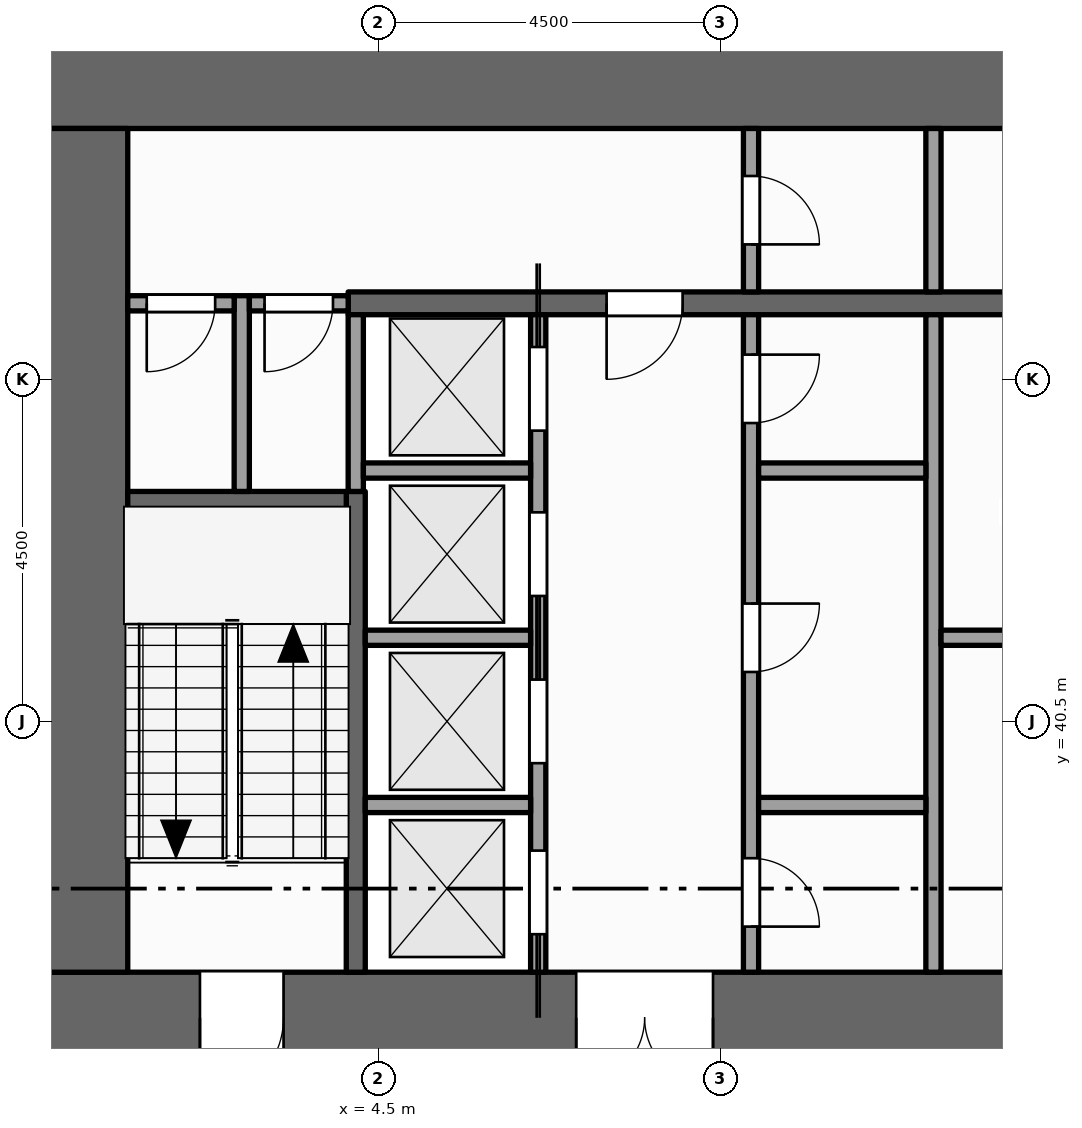
"""IFC4 building model, lengths in metres.
Left out: names, types, materials, properties, quantities, classifications, styles, units other than length and angle.
Written with IfcOpenShell. Run it as: python <this file> out.ifc"""

import sys

from ifc_helpers import new_model, si_unit, direction, frame, frame_2d, origin, place, context, subcontext, project, spatial, rectangle, extrude, element, fill, save


model = new_model("IFC4")
c1 = context("Model", 3, precision=1e-05, world=origin(), true_north=direction((0.0, 1.0)))
c2 = subcontext(c1, "Body", "Model", "MODEL_VIEW")
j1 = project(units=[si_unit("LENGTHUNIT", "METRE"), si_unit("PLANEANGLEUNIT", "RADIAN")], contexts=[c1])
p1 = place(None, origin())
s1 = spatial("IfcSite", under=j1, at=p1, CompositionType="ELEMENT")
p2 = place(p1, origin())
s2 = spatial("IfcBuilding", under=s1, at=p2, CompositionType="ELEMENT")
p3 = place(p2, frame((0.0, 0.0, 103.0)))
s3 = spatial("IfcBuildingStorey", under=s2, at=p3, CompositionType="ELEMENT", Elevation=103.0)
p4 = place(p3, frame((0.0, 36.6, -0.15), z_axis=(0.0, 0.0, 1.0), x_axis=(1.0, 0.0, 0.0)))
e1 = element("IfcWall", 1, at=p4, inside=s3, PredefinedType="SHEAR", context=c2, shape_type="SweptSolid", body=[
    extrude(rectangle(XDim=22.5, YDim=1.2, at=frame_2d((11.25, 0.0))), origin(), (0.0, 0.0, 1.0), 4.0),
])
p5 = place(p4, frame((7.1, 0.0, 0.15)))
e2 = element("IfcOpeningElement", 2, at=p5, cuts=e1, PredefinedType="OPENING", context=c2, shape_type="SweptSolid", body=[
    extrude(rectangle(XDim=1.8, YDim=2.1, at=frame_2d((0.9, 1.05))), frame((0.0, 0.61, 0.0), z_axis=(0.0, -1.0, 0.0), x_axis=(1.0, 0.0, 0.0)), (0.0, 0.0, 1.0), 1.22),
])
p6 = place(p4, frame((13.15, 0.0, 0.15)))
e3 = element("IfcOpeningElement", 3, at=p6, cuts=e1, PredefinedType="OPENING", context=c2, shape_type="SweptSolid", body=[
    extrude(rectangle(XDim=1.1, YDim=2.1, at=frame_2d((0.55, 1.05))), frame((0.0, 0.61, 0.0), z_axis=(0.0, -1.0, 0.0), x_axis=(1.0, 0.0, 0.0)), (0.0, 0.0, 1.0), 1.22),
])
p7 = place(p4, frame((2.15, 0.0, 0.15)))
e4 = element("IfcOpeningElement", 4, at=p7, cuts=e1, PredefinedType="OPENING", context=c2, shape_type="SweptSolid", body=[
    extrude(rectangle(XDim=1.1, YDim=2.1, at=frame_2d((0.55, 1.05))), frame((0.0, 0.61, 0.0), z_axis=(0.0, -1.0, 0.0), x_axis=(1.0, 0.0, 0.0)), (0.0, 0.0, 1.0), 1.22),
])
p8 = place(p4, frame((19.35, 0.0, 0.15)))
e5 = element("IfcOpeningElement", 5, at=p8, cuts=e1, PredefinedType="OPENING", context=c2, shape_type="SweptSolid", body=[
    extrude(rectangle(XDim=1.1, YDim=2.1, at=frame_2d((0.55, 1.05))), frame((0.0, 0.61, 0.0), z_axis=(0.0, -1.0, 0.0), x_axis=(1.0, 0.0, 0.0)), (0.0, 0.0, 1.0), 1.22),
])
p9 = place(p3, frame((0.0, 48.9, -0.15), z_axis=(0.0, 0.0, 1.0), x_axis=(1.0, 0.0, 0.0)))
e6 = element("IfcWall", 6, at=p9, inside=s3, PredefinedType="SHEAR", context=c2, shape_type="SweptSolid", body=[
    extrude(rectangle(XDim=22.5, YDim=1.2, at=frame_2d((11.25, 0.0))), origin(), (0.0, 0.0, 1.0), 4.0),
])
p10 = place(p3, frame((0.6, 37.2, -0.15), z_axis=(0.0, 0.0, 1.0), x_axis=(0.0, 1.0, 0.0)))
e7 = element("IfcWall", 7, at=p10, inside=s3, PredefinedType="SHEAR", context=c2, shape_type="SweptSolid", body=[
    extrude(rectangle(XDim=11.1, YDim=1.2, at=frame_2d((5.55, 0.0))), origin(), (0.0, 0.0, 1.0), 4.0),
])
p11 = place(p3, frame((2.7, 43.525, 0.0), z_axis=(0.0, 0.0, 1.0), x_axis=(0.0, 1.0, 0.0)))
e8 = element("IfcWall", 8, at=p11, inside=s3, PredefinedType="PARTITIONING", context=c2, shape_type="SweptSolid", body=[
    extrude(rectangle(XDim=2.575, YDim=0.2, at=frame_2d((1.288, 0.0))), origin(), (0.0, 0.0, 1.0), 3.85),
])
p12 = place(p3, frame((4.2, 37.2, 0.0), z_axis=(0.0, 0.0, 1.0), x_axis=(0.0, 1.0, 0.0)))
e9 = element("IfcWall", 9, at=p12, inside=s3, PredefinedType="SHEAR", context=c2, shape_type="SweptSolid", body=[
    extrude(rectangle(XDim=6.325, YDim=0.25, at=frame_2d((3.163, 0.0))), origin(), (0.0, 0.0, 1.0), 3.85),
])
p13 = place(p3, frame((4.2, 43.525, 0.0), z_axis=(0.0, 0.0, 1.0), x_axis=(0.0, 1.0, 0.0)))
e10 = element("IfcWall", 10, at=p13, inside=s3, PredefinedType="SOLIDWALL", context=c2, shape_type="SweptSolid", body=[
    extrude(rectangle(XDim=2.325, YDim=0.2, at=frame_2d((1.163, 0.0))), origin(), (0.0, 0.0, 1.0), 3.85),
])
p14 = place(p3, frame((6.6, 37.2, 0.0), z_axis=(0.0, 0.0, 1.0), x_axis=(0.0, 1.0, 0.0)))
e11 = element("IfcWall", 11, at=p14, inside=s3, PredefinedType="SOLIDWALL", context=c2, shape_type="SweptSolid", body=[
    extrude(rectangle(XDim=8.65, YDim=0.2, at=frame_2d((4.325, 0.0))), origin(), (0.0, 0.0, 1.0), 3.85),
])
p15 = place(p14, frame((0.5, 0.0, 0.012)))
e12 = element("IfcOpeningElement", 12, at=p15, cuts=e11, PredefinedType="OPENING", context=c2, shape_type="SweptSolid", body=[
    extrude(rectangle(XDim=1.1, YDim=2.1, at=frame_2d((0.55, 1.05))), frame((0.0, 0.11, 0.0), z_axis=(0.0, -1.0, 0.0), x_axis=(1.0, 0.0, 0.0)), (0.0, 0.0, 1.0), 0.22),
])
p16 = place(p14, frame((2.75, 0.0, 0.012)))
e13 = element("IfcOpeningElement", 13, at=p16, cuts=e11, PredefinedType="OPENING", context=c2, shape_type="SweptSolid", body=[
    extrude(rectangle(XDim=1.1, YDim=2.1, at=frame_2d((0.55, 1.05))), frame((0.0, 0.11, 0.0), z_axis=(0.0, -1.0, 0.0), x_axis=(1.0, 0.0, 0.0)), (0.0, 0.0, 1.0), 0.22),
])
p17 = place(p14, frame((4.95, 0.0, 0.012)))
e14 = element("IfcOpeningElement", 14, at=p17, cuts=e11, PredefinedType="OPENING", context=c2, shape_type="SweptSolid", body=[
    extrude(rectangle(XDim=1.1, YDim=2.1, at=frame_2d((0.55, 1.05))), frame((0.0, 0.11, 0.0), z_axis=(0.0, -1.0, 0.0), x_axis=(1.0, 0.0, 0.0)), (0.0, 0.0, 1.0), 0.22),
])
p18 = place(p14, frame((7.125, 0.0, 0.012)))
e15 = element("IfcOpeningElement", 15, at=p18, cuts=e11, PredefinedType="OPENING", context=c2, shape_type="SweptSolid", body=[
    extrude(rectangle(XDim=1.1, YDim=2.1, at=frame_2d((0.55, 1.05))), frame((0.0, 0.11, 0.0), z_axis=(0.0, -1.0, 0.0), x_axis=(1.0, 0.0, 0.0)), (0.0, 0.0, 1.0), 0.22),
])
p19 = place(p3, frame((9.4, 37.2, 0.0), z_axis=(0.0, 0.0, 1.0), x_axis=(0.0, 1.0, 0.0)))
e16 = element("IfcWall", 16, at=p19, inside=s3, PredefinedType="PARTITIONING", context=c2, shape_type="SweptSolid", body=[
    extrude(rectangle(XDim=8.65, YDim=0.2, at=frame_2d((4.325, 0.0))), origin(), (0.0, 0.0, 1.0), 3.85),
])
p20 = place(p19, frame((0.6, 0.0, 0.0)))
e17 = element("IfcOpeningElement", 17, at=p20, cuts=e16, PredefinedType="OPENING", context=c2, shape_type="SweptSolid", body=[
    extrude(rectangle(XDim=0.9, YDim=2.1, at=frame_2d((0.45, 1.05))), frame((0.0, 0.11, 0.0), z_axis=(0.0, -1.0, 0.0), x_axis=(1.0, 0.0, 0.0)), (0.0, 0.0, 1.0), 0.22),
])
p21 = place(p19, frame((3.95, 0.0, 0.0)))
e18 = element("IfcOpeningElement", 18, at=p21, cuts=e16, PredefinedType="OPENING", context=c2, shape_type="SweptSolid", body=[
    extrude(rectangle(XDim=0.9, YDim=2.1, at=frame_2d((0.45, 1.05))), frame((0.0, 0.11, 0.0), z_axis=(0.0, -1.0, 0.0), x_axis=(1.0, 0.0, 0.0)), (0.0, 0.0, 1.0), 0.22),
])
p22 = place(p19, frame((7.225, 0.0, 0.0)))
e19 = element("IfcOpeningElement", 19, at=p22, cuts=e16, PredefinedType="OPENING", context=c2, shape_type="SweptSolid", body=[
    extrude(rectangle(XDim=0.9, YDim=2.1, at=frame_2d((0.45, 1.05))), frame((0.0, 0.11, 0.0), z_axis=(0.0, -1.0, 0.0), x_axis=(1.0, 0.0, 0.0)), (0.0, 0.0, 1.0), 0.22),
])
p23 = place(p3, frame((9.4, 46.15, 0.0), z_axis=(0.0, 0.0, 1.0), x_axis=(0.0, 1.0, 0.0)))
e20 = element("IfcWall", 20, at=p23, inside=s3, PredefinedType="PARTITIONING", context=c2, shape_type="SweptSolid", body=[
    extrude(rectangle(XDim=2.15, YDim=0.2, at=frame_2d((1.075, 0.0))), origin(), (0.0, 0.0, 1.0), 3.85),
])
p24 = place(p23, frame((0.625, 0.0, 0.0)))
e21 = element("IfcOpeningElement", 21, at=p24, cuts=e20, PredefinedType="OPENING", context=c2, shape_type="SweptSolid", body=[
    extrude(rectangle(XDim=0.9, YDim=2.1, at=frame_2d((0.45, 1.05))), frame((0.0, 0.11, 0.0), z_axis=(0.0, -1.0, 0.0), x_axis=(1.0, 0.0, 0.0)), (0.0, 0.0, 1.0), 0.22),
])
p25 = place(p3, frame((11.8, 37.2, 0.0), z_axis=(0.0, 0.0, 1.0), x_axis=(0.0, 1.0, 0.0)))
e22 = element("IfcWall", 22, at=p25, inside=s3, PredefinedType="PARTITIONING", context=c2, shape_type="SweptSolid", body=[
    extrude(rectangle(XDim=8.65, YDim=0.2, at=frame_2d((4.325, 0.0))), origin(), (0.0, 0.0, 1.0), 3.85),
])
p26 = place(p3, frame((11.8, 46.15, 0.0), z_axis=(0.0, 0.0, 1.0), x_axis=(0.0, 1.0, 0.0)))
e23 = element("IfcWall", 23, at=p26, inside=s3, PredefinedType="PARTITIONING", context=c2, shape_type="SweptSolid", body=[
    extrude(rectangle(XDim=2.15, YDim=0.2, at=frame_2d((1.075, 0.0))), origin(), (0.0, 0.0, 1.0), 3.85),
])
p27 = place(p3, frame((4.325, 39.4, 0.0), z_axis=(0.0, 0.0, 1.0), x_axis=(1.0, 0.0, 0.0)))
e24 = element("IfcWall", 24, at=p27, inside=s3, PredefinedType="SOLIDWALL", context=c2, shape_type="SweptSolid", body=[
    extrude(rectangle(XDim=2.175, YDim=0.2, at=frame_2d((1.087, 0.0))), origin(), (0.0, 0.0, 1.0), 3.85),
])
p28 = place(p3, frame((9.5, 39.4, 0.0), z_axis=(0.0, 0.0, 1.0), x_axis=(1.0, 0.0, 0.0)))
e25 = element("IfcWall", 25, at=p28, inside=s3, PredefinedType="PARTITIONING", context=c2, shape_type="SweptSolid", body=[
    extrude(rectangle(XDim=2.2, YDim=0.2, at=frame_2d((1.1, 0.0))), origin(), (0.0, 0.0, 1.0), 3.85),
])
p29 = place(p3, frame((4.325, 41.6, 0.0), z_axis=(0.0, 0.0, 1.0), x_axis=(1.0, 0.0, 0.0)))
e26 = element("IfcWall", 26, at=p29, inside=s3, PredefinedType="SOLIDWALL", context=c2, shape_type="SweptSolid", body=[
    extrude(rectangle(XDim=2.175, YDim=0.2, at=frame_2d((1.087, 0.0))), origin(), (0.0, 0.0, 1.0), 3.85),
])
p30 = place(p3, frame((11.9, 41.6, 0.0), z_axis=(0.0, 0.0, 1.0), x_axis=(1.0, 0.0, 0.0)))
e27 = element("IfcWall", 27, at=p30, inside=s3, PredefinedType="PARTITIONING", context=c2, shape_type="SweptSolid", body=[
    extrude(rectangle(XDim=3.6, YDim=0.2, at=frame_2d((1.8, 0.0))), origin(), (0.0, 0.0, 1.0), 3.85),
])
p31 = place(p30, frame((1.3, 0.0, 0.0)))
e28 = element("IfcOpeningElement", 28, at=p31, cuts=e27, PredefinedType="OPENING", context=c2, shape_type="SweptSolid", body=[
    extrude(rectangle(XDim=1.0, YDim=2.1, at=frame_2d((0.5, 1.05))), frame((0.0, 0.11, 0.0), z_axis=(0.0, -1.0, 0.0), x_axis=(1.0, 0.0, 0.0)), (0.0, 0.0, 1.0), 0.22),
])
p32 = place(p3, frame((1.2, 43.4, 0.0), z_axis=(0.0, 0.0, 1.0), x_axis=(1.0, 0.0, 0.0)))
e29 = element("IfcWall", 29, at=p32, inside=s3, PredefinedType="SHEAR", context=c2, shape_type="SweptSolid", body=[
    extrude(rectangle(XDim=2.875, YDim=0.25, at=frame_2d((1.438, 0.0))), origin(), (0.0, 0.0, 1.0), 3.85),
])
p33 = place(p3, frame((4.3, 43.8, 0.0), z_axis=(0.0, 0.0, 1.0), x_axis=(1.0, 0.0, 0.0)))
e30 = element("IfcWall", 30, at=p33, inside=s3, PredefinedType="SOLIDWALL", context=c2, shape_type="SweptSolid", body=[
    extrude(rectangle(XDim=2.2, YDim=0.2, at=frame_2d((1.1, 0.0))), origin(), (0.0, 0.0, 1.0), 3.85),
])
p34 = place(p3, frame((9.5, 43.8, 0.0), z_axis=(0.0, 0.0, 1.0), x_axis=(1.0, 0.0, 0.0)))
e31 = element("IfcWall", 31, at=p34, inside=s3, PredefinedType="PARTITIONING", context=c2, shape_type="SweptSolid", body=[
    extrude(rectangle(XDim=2.2, YDim=0.2, at=frame_2d((1.1, 0.0))), origin(), (0.0, 0.0, 1.0), 3.85),
])
p35 = place(p3, frame((1.2, 46.0, 0.0), z_axis=(0.0, 0.0, 1.0), x_axis=(1.0, 0.0, 0.0)))
e32 = element("IfcWall", 32, at=p35, inside=s3, PredefinedType="PARTITIONING", context=c2, shape_type="SweptSolid", body=[
    extrude(rectangle(XDim=1.4, YDim=0.2, at=frame_2d((0.7, 0.0))), origin(), (0.0, 0.0, 1.0), 3.85),
])
p36 = place(p35, frame((0.25, 0.0, 0.0)))
e33 = element("IfcOpeningElement", 33, at=p36, cuts=e32, PredefinedType="OPENING", context=c2, shape_type="SweptSolid", body=[
    extrude(rectangle(XDim=0.9, YDim=2.1, at=frame_2d((0.45, 1.05))), frame((0.0, 0.11, 0.0), z_axis=(0.0, -1.0, 0.0), x_axis=(1.0, 0.0, 0.0)), (0.0, 0.0, 1.0), 0.22),
])
p37 = place(p3, frame((2.8, 46.0, 0.0), z_axis=(0.0, 0.0, 1.0), x_axis=(1.0, 0.0, 0.0)))
e34 = element("IfcWall", 34, at=p37, inside=s3, PredefinedType="PARTITIONING", context=c2, shape_type="SweptSolid", body=[
    extrude(rectangle(XDim=1.3, YDim=0.2, at=frame_2d((0.65, 0.0))), origin(), (0.0, 0.0, 1.0), 3.85),
])
p38 = place(p37, frame((0.2, 0.0, 0.0)))
e35 = element("IfcOpeningElement", 35, at=p38, cuts=e34, PredefinedType="OPENING", context=c2, shape_type="SweptSolid", body=[
    extrude(rectangle(XDim=0.9, YDim=2.1, at=frame_2d((0.45, 1.05))), frame((0.0, 0.11, 0.0), z_axis=(0.0, -1.0, 0.0), x_axis=(1.0, 0.0, 0.0)), (0.0, 0.0, 1.0), 0.22),
])
p39 = place(p3, frame((4.1, 46.0, 0.0), z_axis=(0.0, 0.0, 1.0), x_axis=(1.0, 0.0, 0.0)))
e36 = element("IfcWall", 36, at=p39, inside=s3, PredefinedType="SHEAR", context=c2, shape_type="SweptSolid", body=[
    extrude(rectangle(XDim=14.5, YDim=0.3, at=frame_2d((7.25, 0.0))), origin(), (0.0, 0.0, 1.0), 3.85),
])
p40 = place(p39, frame((3.4, 0.0, 0.0)))
e37 = element("IfcOpeningElement", 37, at=p40, cuts=e36, PredefinedType="OPENING", context=c2, shape_type="SweptSolid", body=[
    extrude(rectangle(XDim=1.0, YDim=2.1, at=frame_2d((0.5, 1.05))), frame((0.0, 0.16, 0.0), z_axis=(0.0, -1.0, 0.0), x_axis=(1.0, 0.0, 0.0)), (0.0, 0.0, 1.0), 0.32),
])
p41 = place(p39, frame((9.1, 0.0, 0.0)))
e38 = element("IfcOpeningElement", 38, at=p41, cuts=e36, PredefinedType="OPENING", context=c2, shape_type="SweptSolid", body=[
    extrude(rectangle(XDim=1.0, YDim=2.1, at=frame_2d((0.5, 1.05))), frame((0.0, 0.16, 0.0), z_axis=(0.0, -1.0, 0.0), x_axis=(1.0, 0.0, 0.0)), (0.0, 0.0, 1.0), 0.32),
])
p42 = place(p15, origin())
e39 = element("IfcDoor", 39, at=p42, inside=s3, OperationType="SLIDING_TO_LEFT", PredefinedType="DOOR", context=c2, shape_type="SweptSolid", body=[
    extrude(rectangle(XDim=1.1, YDim=2.1, at=frame_2d((0.55, 1.05))), frame((0.0, 0.025, 0.0), z_axis=(0.0, -1.0, 0.0), x_axis=(1.0, 0.0, 0.0)), (0.0, 0.0, 1.0), 0.05),
])
fill(e12, e39)
p43 = place(p16, origin())
e40 = element("IfcDoor", 40, at=p43, inside=s3, OperationType="SLIDING_TO_RIGHT", PredefinedType="DOOR", context=c2, shape_type="SweptSolid", body=[
    extrude(rectangle(XDim=1.1, YDim=2.1, at=frame_2d((0.55, 1.05))), frame((0.0, 0.025, 0.0), z_axis=(0.0, -1.0, 0.0), x_axis=(1.0, 0.0, 0.0)), (0.0, 0.0, 1.0), 0.05),
])
fill(e13, e40)
p44 = place(p17, origin())
e41 = element("IfcDoor", 41, at=p44, inside=s3, OperationType="SLIDING_TO_LEFT", PredefinedType="DOOR", context=c2, shape_type="SweptSolid", body=[
    extrude(rectangle(XDim=1.1, YDim=2.1, at=frame_2d((0.55, 1.05))), frame((0.0, 0.025, 0.0), z_axis=(0.0, -1.0, 0.0), x_axis=(1.0, 0.0, 0.0)), (0.0, 0.0, 1.0), 0.05),
])
fill(e14, e41)
p45 = place(p18, origin())
e42 = element("IfcDoor", 42, at=p45, inside=s3, OperationType="SLIDING_TO_RIGHT", PredefinedType="DOOR", context=c2, shape_type="SweptSolid", body=[
    extrude(rectangle(XDim=1.1, YDim=2.1, at=frame_2d((0.55, 1.05))), frame((0.0, 0.025, 0.0), z_axis=(0.0, -1.0, 0.0), x_axis=(1.0, 0.0, 0.0)), (0.0, 0.0, 1.0), 0.05),
])
fill(e15, e42)
p46 = place(p5, origin())
e43 = element("IfcDoor", 43, at=p46, inside=s3, OperationType="DOUBLE_DOOR_SINGLE_SWING", PredefinedType="DOOR", context=c2, shape_type="SweptSolid", body=[
    extrude(rectangle(XDim=1.8, YDim=2.1, at=frame_2d((0.9, 1.05))), frame((0.0, 0.025, 0.0), z_axis=(0.0, -1.0, 0.0), x_axis=(1.0, 0.0, 0.0)), (0.0, 0.0, 1.0), 0.05),
])
fill(e2, e43)
p47 = place(p40, origin())
e44 = element("IfcDoor", 44, at=p47, inside=s3, OperationType="SINGLE_SWING_LEFT", PredefinedType="DOOR", context=c2, shape_type="SweptSolid", body=[
    extrude(rectangle(XDim=1.0, YDim=2.1, at=frame_2d((0.5, 1.05))), frame((0.0, 0.025, 0.0), z_axis=(0.0, -1.0, 0.0), x_axis=(1.0, 0.0, 0.0)), (0.0, 0.0, 1.0), 0.05),
])
fill(e37, e44)
p48 = place(p24, origin())
e45 = element("IfcDoor", 45, at=p48, inside=s3, OperationType="SINGLE_SWING_LEFT", PredefinedType="DOOR", context=c2, shape_type="SweptSolid", body=[
    extrude(rectangle(XDim=0.9, YDim=2.1, at=frame_2d((0.45, 1.05))), frame((0.0, 0.025, 0.0), z_axis=(0.0, -1.0, 0.0), x_axis=(1.0, 0.0, 0.0)), (0.0, 0.0, 1.0), 0.05),
])
fill(e21, e45)
p49 = place(p7, origin())
e46 = element("IfcDoor", 46, at=p49, inside=s3, OperationType="SINGLE_SWING_LEFT", PredefinedType="DOOR", context=c2, shape_type="SweptSolid", body=[
    extrude(rectangle(XDim=1.1, YDim=2.1, at=frame_2d((0.55, 1.05))), frame((0.0, 0.025, 0.0), z_axis=(0.0, -1.0, 0.0), x_axis=(1.0, 0.0, 0.0)), (0.0, 0.0, 1.0), 0.05),
])
fill(e4, e46)
p50 = place(p36, origin())
e47 = element("IfcDoor", 47, at=p50, inside=s3, OperationType="SINGLE_SWING_LEFT", PredefinedType="DOOR", context=c2, shape_type="SweptSolid", body=[
    extrude(rectangle(XDim=0.9, YDim=2.1, at=frame_2d((0.45, 1.05))), frame((0.0, 0.025, 0.0), z_axis=(0.0, -1.0, 0.0), x_axis=(1.0, 0.0, 0.0)), (0.0, 0.0, 1.0), 0.05),
])
fill(e33, e47)
p51 = place(p38, origin())
e48 = element("IfcDoor", 48, at=p51, inside=s3, OperationType="SINGLE_SWING_LEFT", PredefinedType="DOOR", context=c2, shape_type="SweptSolid", body=[
    extrude(rectangle(XDim=0.9, YDim=2.1, at=frame_2d((0.45, 1.05))), frame((0.0, 0.025, 0.0), z_axis=(0.0, -1.0, 0.0), x_axis=(1.0, 0.0, 0.0)), (0.0, 0.0, 1.0), 0.05),
])
fill(e35, e48)
p52 = place(p20, origin())
e49 = element("IfcDoor", 49, at=p52, inside=s3, OperationType="SINGLE_SWING_LEFT", PredefinedType="DOOR", context=c2, shape_type="SweptSolid", body=[
    extrude(rectangle(XDim=0.9, YDim=2.1, at=frame_2d((0.45, 1.05))), frame((0.0, 0.025, 0.0), z_axis=(0.0, -1.0, 0.0), x_axis=(1.0, 0.0, 0.0)), (0.0, 0.0, 1.0), 0.05),
])
fill(e17, e49)
p53 = place(p21, origin())
e50 = element("IfcDoor", 50, at=p53, inside=s3, OperationType="SINGLE_SWING_RIGHT", PredefinedType="DOOR", context=c2, shape_type="SweptSolid", body=[
    extrude(rectangle(XDim=0.9, YDim=2.1, at=frame_2d((0.45, 1.05))), frame((0.0, 0.025, 0.0), z_axis=(0.0, -1.0, 0.0), x_axis=(1.0, 0.0, 0.0)), (0.0, 0.0, 1.0), 0.05),
])
fill(e18, e50)
p54 = place(p22, origin())
e51 = element("IfcDoor", 51, at=p54, inside=s3, OperationType="SINGLE_SWING_RIGHT", PredefinedType="DOOR", context=c2, shape_type="SweptSolid", body=[
    extrude(rectangle(XDim=0.9, YDim=2.1, at=frame_2d((0.45, 1.05))), frame((0.0, 0.025, 0.0), z_axis=(0.0, -1.0, 0.0), x_axis=(1.0, 0.0, 0.0)), (0.0, 0.0, 1.0), 0.05),
])
fill(e19, e51)
save(model, sys.argv[1])
